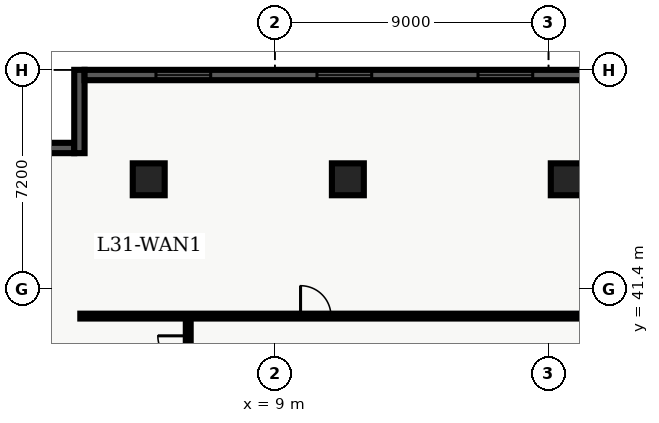
"""IFC4 building model, lengths in metres.
Left out: names, types, materials, properties, quantities, classifications, styles, units other than length and angle.
Written with IfcOpenShell. Run it as: python <this file> out.ifc"""

import sys

from ifc_helpers import new_model, entity, si_unit, converted_unit, direction, frame, origin_with_axes, origin_2d_with_axis, place, context, subcontext, project, spatial, polyline, rectangle, outline, extrude, element, fill, save


model = new_model("IFC4")
c1 = context("Model", 3, precision=1e-05, world=origin_with_axes(), true_north=direction((0.0, 1.0)))
c2 = subcontext(c1, "Body", "Model", "MODEL_VIEW")
j1 = project(units=[si_unit("LENGTHUNIT", "METRE"), converted_unit("PLANEANGLEUNIT", "DEGREE", entity("IfcPlaneAngleMeasure", 0.017), si_unit("PLANEANGLEUNIT", "RADIAN"), dimensions=[0, 0, 0, 0, 0, 0, 0])], contexts=[c1])
p1 = place(None, origin_with_axes())
s1 = spatial("IfcSite", under=j1, at=p1, CompositionType="ELEMENT")
p2 = place(p1, origin_with_axes())
s2 = spatial("IfcBuilding", under=s1, at=p2, CompositionType="ELEMENT")
p3 = place(p2, frame((0.0, 0.0, 129.0), z_axis=(0.0, 0.0, 1.0), x_axis=(1.0, 0.0, 0.0)))
s3 = spatial("IfcBuildingStorey", under=s2, at=p3, CompositionType="ELEMENT", Elevation=129.0)
for number, where, z_axis, x_axis in (
    (1, (11.4, 45.0, 0.0), (0.0, 0.0, 1.0), (1.0, 0.0, 0.0)),
    (2, (18.6, 45.0, 0.0), (0.0, 0.0, 1.0), (1.0, 0.0, 0.0)),
    (3, (4.85, 45.0, 0.0), (0.0, 0.0, 1.0), (1.0, 0.0, 0.0)),
):
    element("IfcColumn", number, at=place(p3, frame(where, z_axis=z_axis, x_axis=x_axis)), inside=s3, PredefinedType="COLUMN", context=c2, shape_type="SweptSolid", body=[
        extrude(rectangle(XDim=1.05, YDim=1.05, at=origin_2d_with_axis()), origin_with_axes(), (0.0, 0.0, 1.0), 3.9),
    ])
p4 = place(p3, frame((2.6, 40.5, 0.0), z_axis=(0.0, 0.0, 1.0), x_axis=(1.0, 0.0, 0.0)))
e4 = element("IfcWall", 4, at=p4, inside=s3, PredefinedType="PARTITIONING", context=c2, shape_type="SweptSolid", body=[
    extrude(outline(polyline([(0.0, -0.08), (18.693, -0.08), (18.693, 0.08), (0.0, 0.08), (0.0, -0.08)])), origin_with_axes(), (0.0, 0.0, 1.0), 2.7),
])
p5 = place(p4, frame((7.744, 0.0, 0.0), z_axis=(0.0, 0.0, 1.0), x_axis=(1.0, 0.0, 0.0)))
e5 = element("IfcOpeningElement", 5, at=p5, cuts=e4, PredefinedType="OPENING", context=c2, shape_type="SweptSolid", body=[
    extrude(rectangle(XDim=1.0, YDim=0.18, at=origin_2d_with_axis()), origin_with_axes(), (0.0, 0.0, 1.0), 2.15),
])
p6 = place(p3, frame((6.15, 7.8, 0.0), z_axis=(0.0, 0.0, 1.0), x_axis=(0.0, 1.0, 0.0)))
e6 = element("IfcWall", 6, at=p6, inside=s3, PredefinedType="PARTITIONING", context=c2, shape_type="SweptSolid", body=[
    extrude(outline(polyline([(0.0, -0.08), (32.7, -0.08), (32.7, 0.08), (0.0, 0.08), (0.0, -0.08)])), origin_with_axes(), (0.0, 0.0, 1.0), 2.7),
])
p7 = place(p6, frame((4.368, 0.0, 0.0), z_axis=(0.0, 0.0, 1.0), x_axis=(1.0, 0.0, 0.0)))
e7 = element("IfcOpeningElement", 7, at=p7, cuts=e6, PredefinedType="OPENING", context=c2, shape_type="SweptSolid", body=[
    extrude(rectangle(XDim=1.0, YDim=0.18, at=origin_2d_with_axis()), origin_with_axes(), (0.0, 0.0, 1.0), 2.15),
])
p8 = place(p6, frame((8.425, 0.0, 0.0), z_axis=(0.0, 0.0, 1.0), x_axis=(1.0, 0.0, 0.0)))
e8 = element("IfcOpeningElement", 8, at=p8, cuts=e6, PredefinedType="OPENING", context=c2, shape_type="SweptSolid", body=[
    extrude(rectangle(XDim=1.0, YDim=0.18, at=origin_2d_with_axis()), origin_with_axes(), (0.0, 0.0, 1.0), 2.15),
])
p9 = place(p6, frame((13.968, 0.0, 0.0), z_axis=(0.0, 0.0, 1.0), x_axis=(1.0, 0.0, 0.0)))
e9 = element("IfcOpeningElement", 9, at=p9, cuts=e6, PredefinedType="OPENING", context=c2, shape_type="SweptSolid", body=[
    extrude(rectangle(XDim=1.0, YDim=0.18, at=origin_2d_with_axis()), origin_with_axes(), (0.0, 0.0, 1.0), 2.15),
])
p10 = place(p6, frame((20.824, 0.0, 0.0), z_axis=(0.0, 0.0, 1.0), x_axis=(1.0, 0.0, 0.0)))
e10 = element("IfcOpeningElement", 10, at=p10, cuts=e6, PredefinedType="OPENING", context=c2, shape_type="SweptSolid", body=[
    extrude(rectangle(XDim=1.0, YDim=0.18, at=origin_2d_with_axis()), origin_with_axes(), (0.0, 0.0, 1.0), 2.15),
])
p11 = place(p6, frame((24.995, 0.0, 0.0), z_axis=(0.0, 0.0, 1.0), x_axis=(1.0, 0.0, 0.0)))
e11 = element("IfcOpeningElement", 11, at=p11, cuts=e6, PredefinedType="OPENING", context=c2, shape_type="SweptSolid", body=[
    extrude(rectangle(XDim=1.0, YDim=0.18, at=origin_2d_with_axis()), origin_with_axes(), (0.0, 0.0, 1.0), 2.15),
])
p12 = place(p6, frame((31.551, 0.0, 0.0), z_axis=(0.0, 0.0, 1.0), x_axis=(1.0, 0.0, 0.0)))
e12 = element("IfcOpeningElement", 12, at=p12, cuts=e6, PredefinedType="OPENING", context=c2, shape_type="SweptSolid", body=[
    extrude(rectangle(XDim=1.0, YDim=0.18, at=origin_2d_with_axis()), origin_with_axes(), (0.0, 0.0, 1.0), 2.15),
])
p13 = place(p3, frame((0.34, 46.03, 0.0), z_axis=(0.0, 0.0, 1.0), x_axis=(1.0, 0.0, 0.0)))
e13 = element("IfcWall", 13, at=p13, inside=s3, PredefinedType="SOLIDWALL", context=c2, shape_type="SweptSolid", body=[
    extrude(outline(polyline([(0.0, -0.17), (2.06, -0.17), (2.06, 0.17), (0.0, 0.17), (0.0, -0.17)])), origin_with_axes(), (0.0, 0.0, 1.0), 3.66),
])
p14 = place(p3, frame((2.57, 45.86, 0.0), z_axis=(0.0, 0.0, 1.0), x_axis=(0.0, 1.0, 0.0)))
e14 = element("IfcWall", 14, at=p14, inside=s3, PredefinedType="SOLIDWALL", context=c2, shape_type="SweptSolid", body=[
    extrude(outline(polyline([(0.0, -0.17), (2.74, -0.17), (2.74, 0.17), (0.0, 0.17), (0.0, -0.17)])), origin_with_axes(), (0.0, 0.0, 1.0), 3.66),
])
p15 = place(p3, frame((2.74, 48.43, 0.0), z_axis=(0.0, 0.0, 1.0), x_axis=(1.0, 0.0, 0.0)))
e15 = element("IfcWall", 15, at=p15, inside=s3, PredefinedType="SOLIDWALL", context=c2, shape_type="SweptSolid", body=[
    extrude(outline(polyline([(0.0, -0.17), (17.088, -0.17), (17.088, 0.17), (0.0, 0.17), (0.0, -0.17)])), origin_with_axes(), (0.0, 0.0, 1.0), 3.66),
])
p16 = place(p15, frame((3.248, 0.0, 0.45), z_axis=(0.0, 0.0, 1.0), x_axis=(1.0, 0.0, 0.0)))
e16 = element("IfcOpeningElement", 16, at=p16, cuts=e15, PredefinedType="OPENING", context=c2, shape_type="SweptSolid", body=[
    extrude(rectangle(XDim=1.8, YDim=0.36, at=origin_2d_with_axis()), origin_with_axes(), (0.0, 0.0, 1.0), 2.1),
])
p17 = place(p15, frame((8.544, 0.0, 0.45), z_axis=(0.0, 0.0, 1.0), x_axis=(1.0, 0.0, 0.0)))
e17 = element("IfcOpeningElement", 17, at=p17, cuts=e15, PredefinedType="OPENING", context=c2, shape_type="SweptSolid", body=[
    extrude(rectangle(XDim=1.8, YDim=0.36, at=origin_2d_with_axis()), origin_with_axes(), (0.0, 0.0, 1.0), 2.1),
])
p18 = place(p15, frame((13.84, 0.0, 0.45), z_axis=(0.0, 0.0, 1.0), x_axis=(1.0, 0.0, 0.0)))
e18 = element("IfcOpeningElement", 18, at=p18, cuts=e15, PredefinedType="OPENING", context=c2, shape_type="SweptSolid", body=[
    extrude(rectangle(XDim=1.8, YDim=0.36, at=origin_2d_with_axis()), origin_with_axes(), (0.0, 0.0, 1.0), 2.1),
])
p19 = place(p6, frame((31.551, 0.0, 0.0), z_axis=(0.0, 0.0, 1.0), x_axis=(1.0, 0.0, 0.0)))
e19 = element("IfcDoor", 19, at=p19, inside=s3, OperationType="SINGLE_SWING_RIGHT", PredefinedType="DOOR", context=c2, shape_type="SweptSolid", body=[
    extrude(rectangle(XDim=1.0, YDim=0.09, at=origin_2d_with_axis()), origin_with_axes(), (0.0, 0.0, 1.0), 2.15),
])
fill(e12, e19)
p20 = place(p4, frame((7.744, 0.0, 0.0), z_axis=(0.0, 0.0, 1.0), x_axis=(1.0, 0.0, 0.0)))
e20 = element("IfcDoor", 20, at=p20, inside=s3, OperationType="SINGLE_SWING_LEFT", PredefinedType="DOOR", context=c2, shape_type="SweptSolid", body=[
    extrude(rectangle(XDim=1.0, YDim=0.09, at=origin_2d_with_axis()), origin_with_axes(), (0.0, 0.0, 1.0), 2.15),
])
fill(e5, e20)
p21 = place(p15, frame((3.248, 0.0, 0.45), z_axis=(0.0, 0.0, 1.0), x_axis=(1.0, 0.0, 0.0)))
e21 = element("IfcWindow", 21, at=p21, inside=s3, PredefinedType="WINDOW", context=c2, shape_type="SweptSolid", body=[
    extrude(rectangle(XDim=1.8, YDim=0.09, at=origin_2d_with_axis()), origin_with_axes(), (0.0, 0.0, 1.0), 2.1),
])
fill(e16, e21)
p22 = place(p15, frame((8.544, 0.0, 0.45), z_axis=(0.0, 0.0, 1.0), x_axis=(1.0, 0.0, 0.0)))
e22 = element("IfcWindow", 22, at=p22, inside=s3, PredefinedType="WINDOW", context=c2, shape_type="SweptSolid", body=[
    extrude(rectangle(XDim=1.8, YDim=0.09, at=origin_2d_with_axis()), origin_with_axes(), (0.0, 0.0, 1.0), 2.1),
])
fill(e17, e22)
p23 = place(p15, frame((13.84, 0.0, 0.45), z_axis=(0.0, 0.0, 1.0), x_axis=(1.0, 0.0, 0.0)))
e23 = element("IfcWindow", 23, at=p23, inside=s3, PredefinedType="WINDOW", context=c2, shape_type="SweptSolid", body=[
    extrude(rectangle(XDim=1.8, YDim=0.09, at=origin_2d_with_axis()), origin_with_axes(), (0.0, 0.0, 1.0), 2.1),
])
fill(e18, e23)
save(model, sys.argv[1])
